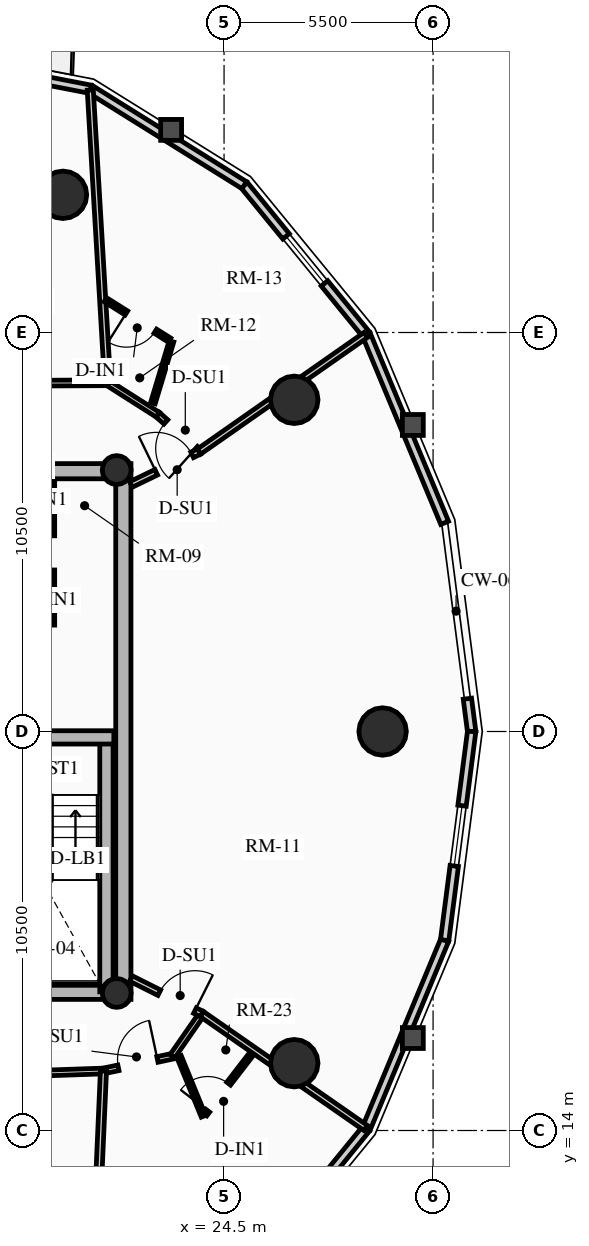
"""IFC4 building model, lengths in metres.
Left out: names, types, materials, properties, quantities, classifications, styles, units other than length and angle.
Written with IfcOpenShell. Run it as: python <this file> out.ifc"""

import sys

from ifc_helpers import new_model, si_unit, direction, frame, frame_2d, origin, origin_2d, place, context, subcontext, project, spatial, rectangle, circle, hollow_circle, extrude, source, transform, mapped, element, fill, save


model = new_model("IFC4")
c1 = context("Model", 3, precision=1e-05, world=origin(), true_north=direction((0.0, 1.0)))
c2 = subcontext(c1, "Body", "Model", "MODEL_VIEW")
j1 = project(units=[si_unit("LENGTHUNIT", "METRE"), si_unit("PLANEANGLEUNIT", "RADIAN")], contexts=[c1])
p1 = place(None, origin())
s1 = spatial("IfcSite", under=j1, at=p1, CompositionType="ELEMENT")
p2 = place(p1, origin())
s2 = spatial("IfcBuilding", under=s1, at=p2, CompositionType="ELEMENT")
p3 = place(p2, frame((0.0, 0.0, 154.51)))
s3 = spatial("IfcBuildingStorey", under=s2, at=p3, CompositionType="ELEMENT", Elevation=154.51)
p4 = place(p3, frame((21.85, 17.45, 0.0), z_axis=(0.0, 0.0, 1.0), x_axis=(0.0, 1.0, 0.0)))
e1 = element("IfcWall", 1, at=p4, inside=s3, PredefinedType="SHEAR", context=c2, shape_type="SweptSolid", body=[
    extrude(rectangle(XDim=14.1, YDim=0.4, at=frame_2d((7.05, 0.0))), origin(), (0.0, 0.0, 1.0), 2.91),
])
p5 = place(p3, frame((11.15, 17.65, 0.0), z_axis=(0.0, 0.0, 1.0), x_axis=(1.0, 0.0, 0.0)))
e2 = element("IfcWall", 2, at=p5, inside=s3, PredefinedType="SHEAR", context=c2, shape_type="SweptSolid", body=[
    extrude(rectangle(XDim=10.7, YDim=0.4, at=frame_2d((5.35, 0.0))), origin(), (0.0, 0.0, 1.0), 2.91),
])
m1 = source(origin(), c2, "Body", "SweptSolid", [
    extrude(rectangle(XDim=1.5, YDim=2.02, at=frame_2d((0.75, 1.01))), frame((0.0, 0.21, 0.0), z_axis=(0.0, -1.0, 0.0), x_axis=(1.0, 0.0, 0.0)), (0.0, 0.0, 1.0), 0.42),
])
p6 = place(p5, frame((5.45, 0.0, 0.0)))
e3 = element("IfcOpeningElement", 3, at=p6, cuts=e2, PredefinedType="OPENING", context=c2, shape_type="MappedRepresentation", body=[
    mapped(m1, transform((0.0, 0.0, 0.0), x_axis=(1.0, 0.0, 0.0), y_axis=(0.0, 1.0, 0.0), z_axis=(0.0, 0.0, 1.0), scale=1.0)),
])
p7 = place(p3, frame((11.15, 31.35, 0.0), z_axis=(0.0, 0.0, 1.0), x_axis=(1.0, 0.0, 0.0)))
e4 = element("IfcWall", 4, at=p7, inside=s3, PredefinedType="SHEAR", context=c2, shape_type="SweptSolid", body=[
    extrude(rectangle(XDim=10.7, YDim=0.4, at=frame_2d((5.35, 0.0))), origin(), (0.0, 0.0, 1.0), 2.91),
])
p8 = place(p7, frame((4.6, 0.0, 0.0)))
e5 = element("IfcOpeningElement", 5, at=p8, cuts=e4, PredefinedType="OPENING", context=c2, shape_type="MappedRepresentation", body=[
    mapped(m1, transform((0.0, 0.0, 0.0), x_axis=(1.0, 0.0, 0.0), y_axis=(0.0, 1.0, 0.0), z_axis=(0.0, 0.0, 1.0), scale=1.0)),
])
p9 = place(p3, frame((21.405, 17.65, 0.0), z_axis=(0.0, 0.0, 1.0), x_axis=(0.0, 1.0, 0.0)))
e6 = element("IfcWall", 6, at=p9, inside=s3, PredefinedType="SHEAR", context=c2, shape_type="SweptSolid", body=[
    extrude(rectangle(XDim=6.695, YDim=0.35, at=frame_2d((3.348, 0.0))), origin(), (0.0, 0.0, 1.0), 2.91),
])
p10 = place(p3, frame((18.315, 24.345, 0.0), z_axis=(0.0, 0.0, 1.0), x_axis=(1.0, 0.0, 0.0)))
e7 = element("IfcWall", 7, at=p10, inside=s3, PredefinedType="SHEAR", context=c2, shape_type="SweptSolid", body=[
    extrude(rectangle(XDim=3.285, YDim=0.35, at=frame_2d((1.643, 0.0))), origin(), (0.0, 0.0, 1.0), 2.91),
])
for number, where, z_axis, x_axis in (
    (8, (21.675, 17.62, 0.0), (0.0, 0.0, 1.0), (1.0, 0.0, 0.0)),
    (9, (21.675, 31.38, 0.0), (0.0, 0.0, 1.0), (1.0, 0.0, 0.0)),
):
    element("IfcColumn", number, at=place(p3, frame(where, z_axis=z_axis, x_axis=x_axis)), inside=s3, PredefinedType="COLUMN", context=c2, shape_type="SweptSolid", body=[
        extrude(hollow_circle(Radius=0.38, WallThickness=0.032, at=origin_2d()), origin(), (0.0, 0.0, 1.0), 2.91),
    ])
for number, where, z_axis, x_axis in (
    (10, (28.672, 24.5, 0.0), (0.0, 0.0, 1.0), (1.0, 0.0, 0.0)),
    (11, (26.347, 33.229, 0.0), (0.0, 0.0, 1.0), (1.0, 0.0, 0.0)),
    (12, (20.261, 38.623, 0.0), (0.0, 0.0, 1.0), (1.0, 0.0, 0.0)),
    (13, (26.347, 15.771, 0.0), (0.0, 0.0, 1.0), (1.0, 0.0, 0.0)),
):
    element("IfcColumn", number, at=place(p3, frame(where, z_axis=z_axis, x_axis=x_axis)), inside=s3, PredefinedType="USERDEFINED", context=c2, shape_type="SweptSolid", body=[
        extrude(circle(Radius=0.625, at=origin_2d()), origin(), (0.0, 0.0, 1.0), 2.91),
    ])
p11 = place(p3, frame((30.903, 25.363, 0.0), z_axis=(0.0, 0.0, 1.0), x_axis=(0.128247365719, -0.991742211054, 0.0)))
e14 = element("IfcWall", 14, at=p11, inside=s3, PredefinedType="SOLIDWALL", context=c2, shape_type="SweptSolid", body=[
    extrude(rectangle(XDim=0.87, YDim=0.22, at=frame_2d((0.435, 0.0))), origin(), (0.0, 0.0, 1.0), 2.675),
])
p12 = place(p3, frame((28.243, 34.945, 0.0), z_axis=(0.0, 0.0, 1.0), x_axis=(0.384259959969, -0.923224936386, 0.0)))
e15 = element("IfcWall", 15, at=p12, inside=s3, PredefinedType="SOLIDWALL", context=c2, shape_type="SweptSolid", body=[
    extrude(rectangle(XDim=5.365, YDim=0.22, at=frame_2d((2.683, 0.0))), origin(), (0.0, 0.0, 1.0), 2.245),
])
p13 = place(p3, frame((25.032, 38.876, 0.0), z_axis=(0.0, 0.0, 1.0), x_axis=(0.632598524901, -0.774479894053, 0.0)))
e16 = element("IfcWall", 16, at=p13, inside=s3, PredefinedType="SOLIDWALL", context=c2, shape_type="SweptSolid", body=[
    extrude(rectangle(XDim=5.076, YDim=0.22, at=frame_2d((2.538, 0.0))), origin(), (0.0, 0.0, 1.0), 2.245),
])
m2 = source(origin(), c2, "Body", "SweptSolid", [
    extrude(rectangle(XDim=1.6, YDim=1.3, at=frame_2d((0.8, 0.65))), frame((0.0, 0.12, 0.0), z_axis=(0.0, -1.0, 0.0), x_axis=(1.0, 0.0, 0.0)), (0.0, 0.0, 1.0), 0.24),
])
p14 = place(p13, frame((1.738, 0.0, 0.65)))
e17 = element("IfcOpeningElement", 17, at=p14, cuts=e16, PredefinedType="OPENING", context=c2, shape_type="MappedRepresentation", body=[
    mapped(m2, transform((0.0, 0.0, 0.0), x_axis=(1.0, 0.0, 0.0), y_axis=(0.0, 1.0, 0.0), z_axis=(0.0, 0.0, 1.0), scale=1.0)),
])
p15 = place(p3, frame((20.985, 41.4, 0.0), z_axis=(0.0, 0.0, 1.0), x_axis=(0.848452391194, -0.529271707044, 0.0)))
e18 = element("IfcWall", 18, at=p15, inside=s3, PredefinedType="SOLIDWALL", context=c2, shape_type="SweptSolid", body=[
    extrude(rectangle(XDim=4.769, YDim=0.22, at=frame_2d((2.385, 0.0))), origin(), (0.0, 0.0, 1.0), 2.245),
])
p16 = place(p3, frame((16.5, 42.27, 0.0), z_axis=(0.0, 0.0, 1.0), x_axis=(0.981718699963, -0.190337579429, 0.0)))
e19 = element("IfcWall", 19, at=p16, inside=s3, PredefinedType="SOLIDWALL", context=c2, shape_type="SweptSolid", body=[
    extrude(rectangle(XDim=4.569, YDim=0.22, at=frame_2d((2.284, 0.0))), origin(), (0.0, 0.0, 1.0), 2.245),
])
m3 = source(origin(), c2, "Body", "SweptSolid", [
    extrude(rectangle(XDim=1.15, YDim=2.005, at=frame_2d((0.575, 1.002))), frame((0.0, 0.12, 0.0), z_axis=(0.0, -1.0, 0.0), x_axis=(1.0, 0.0, 0.0)), (0.0, 0.0, 1.0), 0.24),
])
p17 = place(p16, frame((1.709, 0.0, 0.0)))
e20 = element("IfcOpeningElement", 20, at=p17, cuts=e19, PredefinedType="OPENING", context=c2, shape_type="MappedRepresentation", body=[
    mapped(m3, transform((0.0, 0.0, 0.0), x_axis=(1.0, 0.0, 0.0), y_axis=(0.0, 1.0, 0.0), z_axis=(0.0, 0.0, 1.0), scale=1.0)),
])
p18 = place(p3, frame((28.243, 14.055, 0.0), z_axis=(0.0, 0.0, 1.0), x_axis=(-0.632598524901, -0.774479894053, 0.0)))
e21 = element("IfcWall", 21, at=p18, inside=s3, PredefinedType="SOLIDWALL", context=c2, shape_type="SweptSolid", body=[
    extrude(rectangle(XDim=5.076, YDim=0.22, at=frame_2d((2.538, 0.0))), origin(), (0.0, 0.0, 1.0), 2.245),
])
p19 = place(p18, frame((1.738, 0.0, 0.65)))
e22 = element("IfcOpeningElement", 22, at=p19, cuts=e21, PredefinedType="OPENING", context=c2, shape_type="MappedRepresentation", body=[
    mapped(m2, transform((0.0, 0.0, 0.0), x_axis=(1.0, 0.0, 0.0), y_axis=(0.0, 1.0, 0.0), z_axis=(0.0, 0.0, 1.0), scale=1.0)),
])
p20 = place(p3, frame((30.305, 19.009, 0.0), z_axis=(0.0, 0.0, 1.0), x_axis=(-0.384259959969, -0.923224936386, 0.0)))
e23 = element("IfcWall", 23, at=p20, inside=s3, PredefinedType="SOLIDWALL", context=c2, shape_type="SweptSolid", body=[
    extrude(rectangle(XDim=5.365, YDim=0.22, at=frame_2d((2.683, 0.0))), origin(), (0.0, 0.0, 1.0), 2.245),
])
p21 = place(p3, frame((31.015, 24.5, 0.0), z_axis=(0.0, 0.0, 1.0), x_axis=(-0.128266533912, -0.991739732126, 0.0)))
e24 = element("IfcWall", 24, at=p21, inside=s3, PredefinedType="SOLIDWALL", context=c2, shape_type="SweptSolid", body=[
    extrude(rectangle(XDim=5.537, YDim=0.22, at=frame_2d((2.769, 0.0))), origin(), (0.0, 0.0, 1.0), 2.245),
])
p22 = place(p21, frame((1.968, 0.0, 0.65)))
e25 = element("IfcOpeningElement", 25, at=p22, cuts=e24, PredefinedType="OPENING", context=c2, shape_type="MappedRepresentation", body=[
    mapped(m2, transform((0.0, 0.0, 0.0), x_axis=(1.0, 0.0, 0.0), y_axis=(0.0, 1.0, 0.0), z_axis=(0.0, 0.0, 1.0), scale=1.0)),
])
p23 = place(p3, frame((19.98, 27.3, 0.0), z_axis=(0.0, 0.0, 1.0), x_axis=(0.0, 1.0, 0.0)))
e26 = element("IfcWall", 26, at=p23, inside=s3, PredefinedType="PARTITIONING", context=c2, shape_type="SweptSolid", body=[
    extrude(rectangle(XDim=3.82, YDim=0.125, at=frame_2d((1.91, 0.0))), origin(), (0.0, 0.0, 1.0), 2.675),
])
m4 = source(origin(), c2, "Body", "SweptSolid", [
    extrude(rectangle(XDim=0.9, YDim=2.005, at=frame_2d((0.45, 1.002))), frame((0.0, 0.073, 0.0), z_axis=(0.0, -1.0, 0.0), x_axis=(1.0, 0.0, 0.0)), (0.0, 0.0, 1.0), 0.145),
])
p24 = place(p23, frame((1.45, 0.0, 0.0)))
e27 = element("IfcOpeningElement", 27, at=p24, cuts=e26, PredefinedType="OPENING", context=c2, shape_type="MappedRepresentation", body=[
    mapped(m4, transform((0.0, 0.0, 0.0), x_axis=(1.0, 0.0, 0.0), y_axis=(0.0, 1.0, 0.0), z_axis=(0.0, 0.0, 1.0), scale=1.0)),
])
p25 = place(p3, frame((23.841, 31.866, 0.0), z_axis=(0.0, 0.0, 1.0), x_axis=(-0.74511843306, 0.666932171, 0.0)))
e28 = element("IfcWall", 28, at=p25, inside=s3, PredefinedType="PARTITIONING", context=c2, shape_type="SweptSolid", body=[
    extrude(rectangle(XDim=1.455, YDim=0.15, at=frame_2d((0.728, 0.0))), origin(), (0.0, 0.0, 1.0), 2.245),
])
m5 = source(origin(), c2, "Body", "SweptSolid", [
    extrude(rectangle(XDim=1.05, YDim=2.015, at=frame_2d((0.525, 1.007))), frame((0.0, 0.085, 0.0), z_axis=(0.0, -1.0, 0.0), x_axis=(1.0, 0.0, 0.0)), (0.0, 0.0, 1.0), 0.17),
])
p26 = place(p25, frame((0.12, 0.0, 0.0)))
e29 = element("IfcOpeningElement", 29, at=p26, cuts=e28, PredefinedType="OPENING", context=c2, shape_type="MappedRepresentation", body=[
    mapped(m5, transform((0.0, 0.0, 0.0), x_axis=(1.0, 0.0, 0.0), y_axis=(0.0, 1.0, 0.0), z_axis=(0.0, 0.0, 1.0), scale=1.0)),
])
p27 = place(p3, frame((22.756, 32.836, 0.0), z_axis=(0.0, 0.0, 1.0), x_axis=(-0.843828401801, 0.536613108593, 0.0)))
e30 = element("IfcWall", 30, at=p27, inside=s3, PredefinedType="PARTITIONING", context=c2, shape_type="SweptSolid", body=[
    extrude(rectangle(XDim=1.565, YDim=0.15, at=frame_2d((0.783, 0.0))), origin(), (0.0, 0.0, 1.0), 2.245),
])
p28 = place(p3, frame((21.435, 33.677, 0.0), z_axis=(0.0, 0.0, 1.0), x_axis=(-0.999986775557, -0.005142831114, 0.0)))
e31 = element("IfcWall", 31, at=p28, inside=s3, PredefinedType="PARTITIONING", context=c2, shape_type="SweptSolid", body=[
    extrude(rectangle(XDim=3.323, YDim=0.15, at=frame_2d((1.662, 0.0))), origin(), (0.0, 0.0, 1.0), 2.245),
])
p29 = place(p28, frame((1.645, 0.0, 0.0)))
e32 = element("IfcOpeningElement", 32, at=p29, cuts=e31, PredefinedType="OPENING", context=c2, shape_type="MappedRepresentation", body=[
    mapped(m5, transform((0.0, 0.0, 0.0), x_axis=(1.0, 0.0, 0.0), y_axis=(0.0, 1.0, 0.0), z_axis=(0.0, 0.0, 1.0), scale=1.0)),
])
p30 = place(p3, frame((14.813, 15.341, 0.0), z_axis=(0.0, 0.0, 1.0), x_axis=(0.999402077819, 0.034575813105, 0.0)))
e33 = element("IfcWall", 33, at=p30, inside=s3, PredefinedType="PARTITIONING", context=c2, shape_type="SweptSolid", body=[
    extrude(rectangle(XDim=6.517, YDim=0.15, at=frame_2d((3.259, 0.0))), origin(), (0.0, 0.0, 1.0), 2.245),
])
p31 = place(p30, frame((2.734, 0.0, 0.0)))
e34 = element("IfcOpeningElement", 34, at=p31, cuts=e33, PredefinedType="OPENING", context=c2, shape_type="MappedRepresentation", body=[
    mapped(m5, transform((0.0, 0.0, 0.0), x_axis=(1.0, 0.0, 0.0), y_axis=(0.0, 1.0, 0.0), z_axis=(0.0, 0.0, 1.0), scale=1.0)),
])
p32 = place(p3, frame((21.326, 15.566, 0.0), z_axis=(0.0, 0.0, 1.0), x_axis=(0.977908238308, 0.209034632176, 0.0)))
e35 = element("IfcWall", 35, at=p32, inside=s3, PredefinedType="PARTITIONING", context=c2, shape_type="SweptSolid", body=[
    extrude(rectangle(XDim=1.855, YDim=0.15, at=frame_2d((0.927, 0.0))), origin(), (0.0, 0.0, 1.0), 2.245),
])
p33 = place(p32, frame((0.402, 0.0, 0.0)))
e36 = element("IfcOpeningElement", 36, at=p33, cuts=e35, PredefinedType="OPENING", context=c2, shape_type="MappedRepresentation", body=[
    mapped(m5, transform((0.0, 0.0, 0.0), x_axis=(1.0, 0.0, 0.0), y_axis=(0.0, 1.0, 0.0), z_axis=(0.0, 0.0, 1.0), scale=1.0)),
])
p34 = place(p3, frame((23.14, 15.954, 0.0), z_axis=(0.0, 0.0, 1.0), x_axis=(0.570699895117, 0.821158711647, 0.0)))
e37 = element("IfcWall", 37, at=p34, inside=s3, PredefinedType="PARTITIONING", context=c2, shape_type="SweptSolid", body=[
    extrude(rectangle(XDim=1.354, YDim=0.15, at=frame_2d((0.677, 0.0))), origin(), (0.0, 0.0, 1.0), 2.245),
])
p35 = place(p3, frame((23.841, 31.866, 0.0), z_axis=(0.0, 0.0, 1.0), x_axis=(0.819514693563, 0.573058170724, 0.0)))
e38 = element("IfcWall", 38, at=p35, inside=s3, PredefinedType="PARTITIONING", context=c2, shape_type="SweptSolid", body=[
    extrude(rectangle(XDim=5.352, YDim=0.16, at=frame_2d((2.676, 0.0))), origin(), (0.0, 0.0, 1.0), 2.245),
])
p36 = place(p3, frame((21.435, 33.677, 0.0), z_axis=(0.0, 0.0, 1.0), x_axis=(-0.059087305226, 0.99825281886, 0.0)))
e39 = element("IfcWall", 39, at=p36, inside=s3, PredefinedType="PARTITIONING", context=c2, shape_type="SweptSolid", body=[
    extrude(rectangle(XDim=7.718, YDim=0.16, at=frame_2d((3.859, 0.0))), origin(), (0.0, 0.0, 1.0), 2.245),
])
p37 = place(p3, frame((21.326, 15.566, 0.0), z_axis=(0.0, 0.0, 1.0), x_axis=(-0.043642330618, -0.999047219594, 0.0)))
e40 = element("IfcWall", 40, at=p37, inside=s3, PredefinedType="PARTITIONING", context=c2, shape_type="SweptSolid", body=[
    extrude(rectangle(XDim=7.955, YDim=0.16, at=frame_2d((3.978, 0.0))), origin(), (0.0, 0.0, 1.0), 2.245),
])
p38 = place(p3, frame((23.913, 17.065, 0.0), z_axis=(0.0, 0.0, 1.0), x_axis=(0.821126775727, -0.570745843773, 0.0)))
e41 = element("IfcWall", 41, at=p38, inside=s3, PredefinedType="PARTITIONING", context=c2, shape_type="SweptSolid", body=[
    extrude(rectangle(XDim=5.254, YDim=0.16, at=frame_2d((2.627, 0.0))), origin(), (0.0, 0.0, 1.0), 2.245),
])
p39 = place(p3, frame((22.05, 31.0, 0.0), z_axis=(0.0, 0.0, 1.0), x_axis=(0.900241516545, 0.435390872537, 0.0)))
e42 = element("IfcWall", 42, at=p39, inside=s3, PredefinedType="PARTITIONING", context=c2, shape_type="SweptSolid", body=[
    extrude(rectangle(XDim=1.989, YDim=0.16, at=frame_2d((0.995, 0.0))), origin(), (0.0, 0.0, 1.0), 2.245),
])
m6 = source(origin(), c2, "Body", "SweptSolid", [
    extrude(rectangle(XDim=1.05, YDim=2.015, at=frame_2d((0.525, 1.007))), frame((0.0, 0.09, 0.0), z_axis=(0.0, -1.0, 0.0), x_axis=(1.0, 0.0, 0.0)), (0.0, 0.0, 1.0), 0.18),
])
p40 = place(p39, frame((0.739, 0.0, 0.0)))
e43 = element("IfcOpeningElement", 43, at=p40, cuts=e42, PredefinedType="OPENING", context=c2, shape_type="MappedRepresentation", body=[
    mapped(m6, transform((0.0, 0.0, 0.0), x_axis=(1.0, 0.0, 0.0), y_axis=(0.0, 1.0, 0.0), z_axis=(0.0, 0.0, 1.0), scale=1.0)),
])
p41 = place(p3, frame((22.05, 18.0, 0.0), z_axis=(0.0, 0.0, 1.0), x_axis=(0.893817206679, -0.448431489799, 0.0)))
e44 = element("IfcWall", 44, at=p41, inside=s3, PredefinedType="PARTITIONING", context=c2, shape_type="SweptSolid", body=[
    extrude(rectangle(XDim=2.084, YDim=0.16, at=frame_2d((1.042, 0.0))), origin(), (0.0, 0.0, 1.0), 2.245),
])
p42 = place(p41, frame((0.834, 0.0, 0.0)))
e45 = element("IfcOpeningElement", 45, at=p42, cuts=e44, PredefinedType="OPENING", context=c2, shape_type="MappedRepresentation", body=[
    mapped(m6, transform((0.0, 0.0, 0.0), x_axis=(1.0, 0.0, 0.0), y_axis=(0.0, 1.0, 0.0), z_axis=(0.0, 0.0, 1.0), scale=1.0)),
])
p43 = place(p3, frame((22.628, 33.142, 0.0), z_axis=(0.0, 0.0, 1.0), x_axis=(0.28808673097, 0.957604320917, 0.0)))
e46 = element("IfcWall", 46, at=p43, inside=s3, PredefinedType="PARTITIONING", context=c2, shape_type="SweptSolid", body=[
    extrude(rectangle(XDim=1.698, YDim=0.125, at=frame_2d((0.849, 0.0))), origin(), (0.0, 0.0, 1.0), 2.245),
])
p44 = place(p3, frame((23.064, 34.801, 0.0), z_axis=(0.0, 0.0, 1.0), x_axis=(-0.846418905871, 0.532517638942, 0.0)))
e47 = element("IfcWall", 47, at=p44, inside=s3, PredefinedType="PARTITIONING", context=c2, shape_type="SweptSolid", body=[
    extrude(rectangle(XDim=1.993, YDim=0.125, at=frame_2d((0.997, 0.0))), origin(), (0.0, 0.0, 1.0), 2.675),
])
p45 = place(p44, frame((0.44, 0.0, 0.0)))
e48 = element("IfcOpeningElement", 48, at=p45, cuts=e47, PredefinedType="OPENING", context=c2, shape_type="MappedRepresentation", body=[
    mapped(m4, transform((0.0, 0.0, 0.0), x_axis=(1.0, 0.0, 0.0), y_axis=(0.0, 1.0, 0.0), z_axis=(0.0, 0.0, 1.0), scale=1.0)),
])
p46 = place(p3, frame((23.315, 15.947, 0.0), z_axis=(0.0, 0.0, 1.0), x_axis=(0.37920929394, -0.925310926873, 0.0)))
e49 = element("IfcWall", 49, at=p46, inside=s3, PredefinedType="PARTITIONING", context=c2, shape_type="SweptSolid", body=[
    extrude(rectangle(XDim=1.698, YDim=0.125, at=frame_2d((0.849, 0.0))), origin(), (0.0, 0.0, 1.0), 2.675),
])
p47 = place(p3, frame((23.998, 14.425, 0.0), z_axis=(0.0, 0.0, 1.0), x_axis=(0.610534539262, 0.791989631478, 0.0)))
e50 = element("IfcWall", 50, at=p47, inside=s3, PredefinedType="PARTITIONING", context=c2, shape_type="SweptSolid", body=[
    extrude(rectangle(XDim=2.033, YDim=0.125, at=frame_2d((1.017, 0.0))), origin(), (0.0, 0.0, 1.0), 2.675),
])
p48 = place(p47, frame((0.12, 0.0, 0.0)))
e51 = element("IfcOpeningElement", 51, at=p48, cuts=e50, PredefinedType="OPENING", context=c2, shape_type="MappedRepresentation", body=[
    mapped(m4, transform((0.0, 0.0, 0.0), x_axis=(1.0, 0.0, 0.0), y_axis=(0.0, 1.0, 0.0), z_axis=(0.0, 0.0, 1.0), scale=1.0)),
])
m7 = source(origin(), c2, "Body", "SweptSolid", [
    extrude(rectangle(XDim=1.6, YDim=1.3, at=frame_2d((0.8, 0.65))), frame((0.0, 0.03, 0.0), z_axis=(0.0, -1.0, 0.0), x_axis=(1.0, 0.0, 0.0)), (0.0, 0.0, 1.0), 0.06),
])
p49 = place(p14, origin())
e52 = element("IfcWindow", 52, at=p49, inside=s3, PartitioningType="SINGLE_PANEL", PredefinedType="WINDOW", context=c2, shape_type="MappedRepresentation", body=[
    mapped(m7, transform((0.0, 0.0, 0.0), x_axis=(1.0, 0.0, 0.0), y_axis=(0.0, 1.0, 0.0), z_axis=(0.0, 0.0, 1.0), scale=1.0)),
])
fill(e17, e52)
p50 = place(p22, origin())
e53 = element("IfcWindow", 53, at=p50, inside=s3, PartitioningType="SINGLE_PANEL", PredefinedType="WINDOW", context=c2, shape_type="MappedRepresentation", body=[
    mapped(m7, transform((0.0, 0.0, 0.0), x_axis=(1.0, 0.0, 0.0), y_axis=(0.0, 1.0, 0.0), z_axis=(0.0, 0.0, 1.0), scale=1.0)),
])
fill(e25, e53)
m8 = source(origin(), c2, "Body", "SweptSolid", [
    extrude(rectangle(XDim=0.9, YDim=2.005, at=frame_2d((0.45, 1.002))), frame((0.0, 0.025, 0.0), z_axis=(0.0, -1.0, 0.0), x_axis=(1.0, 0.0, 0.0)), (0.0, 0.0, 1.0), 0.05),
])
p51 = place(p24, origin())
e54 = element("IfcDoor", 54, at=p51, inside=s3, OperationType="SINGLE_SWING_RIGHT", PredefinedType="DOOR", context=c2, shape_type="MappedRepresentation", body=[
    mapped(m8, transform((0.0, 0.0, 0.0), x_axis=(1.0, 0.0, 0.0), y_axis=(0.0, 1.0, 0.0), z_axis=(0.0, 0.0, 1.0), scale=1.0)),
])
fill(e27, e54)
m9 = source(origin(), c2, "Body", "SweptSolid", [
    extrude(rectangle(XDim=1.05, YDim=2.015, at=frame_2d((0.525, 1.007))), frame((0.0, 0.025, 0.0), z_axis=(0.0, -1.0, 0.0), x_axis=(1.0, 0.0, 0.0)), (0.0, 0.0, 1.0), 0.05),
])
p52 = place(p40, origin())
e55 = element("IfcDoor", 55, at=p52, inside=s3, OperationType="SINGLE_SWING_LEFT", PredefinedType="DOOR", context=c2, shape_type="MappedRepresentation", body=[
    mapped(m9, transform((0.0, 0.0, 0.0), x_axis=(1.0, 0.0, 0.0), y_axis=(0.0, 1.0, 0.0), z_axis=(0.0, 0.0, 1.0), scale=1.0)),
])
fill(e43, e55)
p53 = place(p42, origin())
e56 = element("IfcDoor", 56, at=p53, inside=s3, OperationType="SINGLE_SWING_RIGHT", PredefinedType="DOOR", context=c2, shape_type="MappedRepresentation", body=[
    mapped(m9, transform((0.0, 0.0, 0.0), x_axis=(1.0, 0.0, 0.0), y_axis=(0.0, 1.0, 0.0), z_axis=(0.0, 0.0, 1.0), scale=1.0)),
])
fill(e45, e56)
p54 = place(p26, origin())
e57 = element("IfcDoor", 57, at=p54, inside=s3, OperationType="SINGLE_SWING_LEFT", PredefinedType="DOOR", context=c2, shape_type="MappedRepresentation", body=[
    mapped(m9, transform((0.0, 0.0, 0.0), x_axis=(1.0, 0.0, 0.0), y_axis=(0.0, 1.0, 0.0), z_axis=(0.0, 0.0, 1.0), scale=1.0)),
])
fill(e29, e57)
p55 = place(p45, origin())
e58 = element("IfcDoor", 58, at=p55, inside=s3, OperationType="SINGLE_SWING_RIGHT", PredefinedType="DOOR", context=c2, shape_type="MappedRepresentation", body=[
    mapped(m8, transform((0.0, 0.0, 0.0), x_axis=(1.0, 0.0, 0.0), y_axis=(0.0, 1.0, 0.0), z_axis=(0.0, 0.0, 1.0), scale=1.0)),
])
fill(e48, e58)
p56 = place(p33, origin())
e59 = element("IfcDoor", 59, at=p56, inside=s3, OperationType="SINGLE_SWING_RIGHT", PredefinedType="DOOR", context=c2, shape_type="MappedRepresentation", body=[
    mapped(m9, transform((0.0, 0.0, 0.0), x_axis=(1.0, 0.0, 0.0), y_axis=(0.0, 1.0, 0.0), z_axis=(0.0, 0.0, 1.0), scale=1.0)),
])
fill(e36, e59)
p57 = place(p48, origin())
e60 = element("IfcDoor", 60, at=p57, inside=s3, OperationType="SINGLE_SWING_LEFT", PredefinedType="DOOR", context=c2, shape_type="MappedRepresentation", body=[
    mapped(m8, transform((0.0, 0.0, 0.0), x_axis=(1.0, 0.0, 0.0), y_axis=(0.0, 1.0, 0.0), z_axis=(0.0, 0.0, 1.0), scale=1.0)),
])
fill(e51, e60)
save(model, sys.argv[1])
